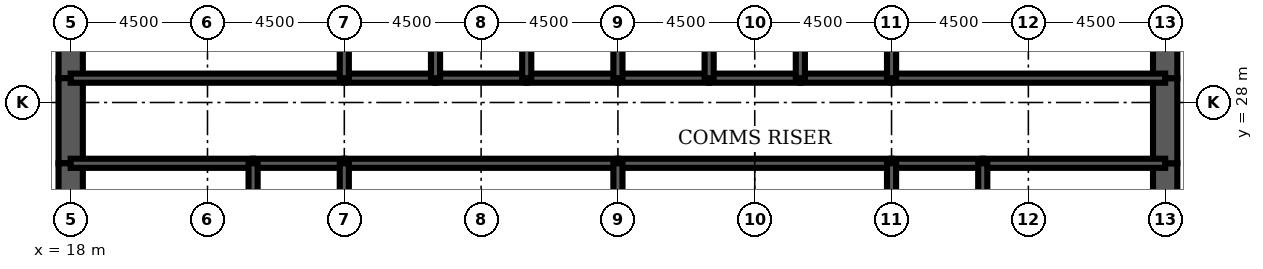
"""IFC4 building model, lengths in metres.
Left out: names, types, materials, properties, quantities, classifications, styles, units other than length and angle.
Written with IfcOpenShell. Run it as: python <this file> out.ifc"""

import sys

from ifc_helpers import new_model, si_unit, direction, frame, frame_2d, origin, place, context, subcontext, project, spatial, rectangle, extrude, element, fill, save


model = new_model("IFC4")
c1 = context("Model", 3, precision=1e-05, world=origin(), true_north=direction((0.0, 1.0)))
c2 = subcontext(c1, "Body", "Model", "MODEL_VIEW")
j1 = project(units=[si_unit("LENGTHUNIT", "METRE"), si_unit("PLANEANGLEUNIT", "RADIAN")], contexts=[c1])
p1 = place(None, origin())
s1 = spatial("IfcSite", under=j1, at=p1, CompositionType="ELEMENT")
p2 = place(p1, origin())
s2 = spatial("IfcBuilding", under=s1, at=p2, CompositionType="ELEMENT")
p3 = place(p2, frame((0.0, 0.0, 232.0)))
s3 = spatial("IfcBuildingStorey", under=s2, at=p3, CompositionType="ELEMENT", Elevation=232.0)
p4 = place(p3, frame((18.0, 32.0, 0.0), z_axis=(0.0, 0.0, 1.0), x_axis=(0.0, -1.0, 0.0)))
e1 = element("IfcWall", 1, at=p4, inside=s3, PredefinedType="SHEAR", context=c2, shape_type="SweptSolid", body=[
    extrude(rectangle(XDim=3.2, YDim=0.8, at=frame_2d((1.6, 0.0))), origin(), (0.0, 0.0, 1.0), 4.2),
])
p5 = place(p3, frame((18.0, 28.8, 0.0), z_axis=(0.0, 0.0, 1.0), x_axis=(0.0, -1.0, 0.0)))
e2 = element("IfcWall", 2, at=p5, inside=s3, PredefinedType="SHEAR", context=c2, shape_type="SweptSolid", body=[
    extrude(rectangle(XDim=2.8, YDim=0.8, at=frame_2d((1.4, 0.0))), origin(), (0.0, 0.0, 1.0), 4.2),
])
p6 = place(p5, frame((0.4, 0.0, 0.0)))
e3 = element("IfcOpeningElement", 3, at=p6, cuts=e2, PredefinedType="OPENING", context=c2, shape_type="SweptSolid", body=[
    extrude(rectangle(XDim=1.8, YDim=2.1, at=frame_2d((0.9, 1.05))), frame((0.0, 0.41, 0.0), z_axis=(0.0, -1.0, 0.0), x_axis=(1.0, 0.0, 0.0)), (0.0, 0.0, 1.0), 0.82),
])
for number, where, z_axis, x_axis in (
    (4, (18.0, 26.0, 0.0), (0.0, 0.0, 1.0), (0.0, -1.0, 0.0)),
    (5, (54.0, 22.0, 0.0), (0.0, 0.0, 1.0), (0.0, 1.0, 0.0)),
):
    element("IfcWall", number, at=place(p3, frame(where, z_axis=z_axis, x_axis=x_axis)), inside=s3, PredefinedType="SHEAR", context=c2, shape_type="SweptSolid", body=[
        extrude(rectangle(XDim=4.0, YDim=0.8, at=frame_2d((2.0, 0.0))), origin(), (0.0, 0.0, 1.0), 4.2),
    ])
p7 = place(p3, frame((54.0, 26.0, 0.0), z_axis=(0.0, 0.0, 1.0), x_axis=(0.0, 1.0, 0.0)))
e6 = element("IfcWall", 6, at=p7, inside=s3, PredefinedType="SHEAR", context=c2, shape_type="SweptSolid", body=[
    extrude(rectangle(XDim=2.8, YDim=0.8, at=frame_2d((1.4, 0.0))), origin(), (0.0, 0.0, 1.0), 4.2),
])
p8 = place(p7, frame((0.6, 0.0, 0.0)))
e7 = element("IfcOpeningElement", 7, at=p8, cuts=e6, PredefinedType="OPENING", context=c2, shape_type="SweptSolid", body=[
    extrude(rectangle(XDim=1.8, YDim=2.1, at=frame_2d((0.9, 1.05))), frame((0.0, 0.41, 0.0), z_axis=(0.0, -1.0, 0.0), x_axis=(1.0, 0.0, 0.0)), (0.0, 0.0, 1.0), 0.82),
])
p9 = place(p3, frame((54.0, 28.8, 0.0), z_axis=(0.0, 0.0, 1.0), x_axis=(0.0, 1.0, 0.0)))
e8 = element("IfcWall", 8, at=p9, inside=s3, PredefinedType="SHEAR", context=c2, shape_type="SweptSolid", body=[
    extrude(rectangle(XDim=3.2, YDim=0.8, at=frame_2d((1.6, 0.0))), origin(), (0.0, 0.0, 1.0), 4.2),
])
p10 = place(p3, frame((18.0, 28.8, 0.0), z_axis=(0.0, 0.0, 1.0), x_axis=(1.0, 0.0, 0.0)))
e9 = element("IfcWall", 9, at=p10, inside=s3, PredefinedType="SOLIDWALL", context=c2, shape_type="SweptSolid", body=[
    extrude(rectangle(XDim=9.0, YDim=0.3, at=frame_2d((4.5, 0.0))), origin(), (0.0, 0.0, 1.0), 4.2),
])
p11 = place(p10, frame((0.65, 0.0, 0.0)))
e10 = element("IfcOpeningElement", 10, at=p11, cuts=e9, PredefinedType="OPENING", context=c2, shape_type="SweptSolid", body=[
    extrude(rectangle(XDim=1.0, YDim=2.1, at=frame_2d((0.5, 1.05))), frame((0.0, 0.16, 0.0), z_axis=(0.0, -1.0, 0.0), x_axis=(1.0, 0.0, 0.0)), (0.0, 0.0, 1.0), 0.32),
])
p12 = place(p3, frame((27.0, 28.8, 0.0), z_axis=(0.0, 0.0, 1.0), x_axis=(1.0, 0.0, 0.0)))
e11 = element("IfcWall", 11, at=p12, inside=s3, PredefinedType="SOLIDWALL", context=c2, shape_type="SweptSolid", body=[
    extrude(rectangle(XDim=3.0, YDim=0.3, at=frame_2d((1.5, 0.0))), origin(), (0.0, 0.0, 1.0), 4.2),
])
p13 = place(p12, frame((0.95, 0.0, 0.0)))
e12 = element("IfcOpeningElement", 12, at=p13, cuts=e11, PredefinedType="OPENING", context=c2, shape_type="SweptSolid", body=[
    extrude(rectangle(XDim=1.1, YDim=2.2, at=frame_2d((0.55, 1.1))), frame((0.0, 0.16, 0.0), z_axis=(0.0, -1.0, 0.0), x_axis=(1.0, 0.0, 0.0)), (0.0, 0.0, 1.0), 0.32),
])
p14 = place(p3, frame((30.0, 28.8, 0.0), z_axis=(0.0, 0.0, 1.0), x_axis=(1.0, 0.0, 0.0)))
e13 = element("IfcWall", 13, at=p14, inside=s3, PredefinedType="SOLIDWALL", context=c2, shape_type="SweptSolid", body=[
    extrude(rectangle(XDim=3.0, YDim=0.3, at=frame_2d((1.5, 0.0))), origin(), (0.0, 0.0, 1.0), 4.2),
])
p15 = place(p14, frame((0.95, 0.0, 0.0)))
e14 = element("IfcOpeningElement", 14, at=p15, cuts=e13, PredefinedType="OPENING", context=c2, shape_type="SweptSolid", body=[
    extrude(rectangle(XDim=1.1, YDim=2.2, at=frame_2d((0.55, 1.1))), frame((0.0, 0.16, 0.0), z_axis=(0.0, -1.0, 0.0), x_axis=(1.0, 0.0, 0.0)), (0.0, 0.0, 1.0), 0.32),
])
p16 = place(p3, frame((33.0, 28.8, 0.0), z_axis=(0.0, 0.0, 1.0), x_axis=(1.0, 0.0, 0.0)))
e15 = element("IfcWall", 15, at=p16, inside=s3, PredefinedType="SOLIDWALL", context=c2, shape_type="SweptSolid", body=[
    extrude(rectangle(XDim=3.0, YDim=0.3, at=frame_2d((1.5, 0.0))), origin(), (0.0, 0.0, 1.0), 4.2),
])
p17 = place(p16, frame((0.95, 0.0, 0.0)))
e16 = element("IfcOpeningElement", 16, at=p17, cuts=e15, PredefinedType="OPENING", context=c2, shape_type="SweptSolid", body=[
    extrude(rectangle(XDim=1.1, YDim=2.2, at=frame_2d((0.55, 1.1))), frame((0.0, 0.16, 0.0), z_axis=(0.0, -1.0, 0.0), x_axis=(1.0, 0.0, 0.0)), (0.0, 0.0, 1.0), 0.32),
])
for number, where, z_axis, x_axis in (
    (17, (36.0, 28.8, 0.0), (0.0, 0.0, 1.0), (1.0, 0.0, 0.0)),
    (18, (39.0, 28.8, 0.0), (0.0, 0.0, 1.0), (1.0, 0.0, 0.0)),
):
    element("IfcWall", number, at=place(p3, frame(where, z_axis=z_axis, x_axis=x_axis)), inside=s3, PredefinedType="SOLIDWALL", context=c2, shape_type="SweptSolid", body=[
        extrude(rectangle(XDim=3.0, YDim=0.3, at=frame_2d((1.5, 0.0))), origin(), (0.0, 0.0, 1.0), 4.2),
    ])
p18 = place(p3, frame((42.0, 28.8, 0.0), z_axis=(0.0, 0.0, 1.0), x_axis=(1.0, 0.0, 0.0)))
e19 = element("IfcWall", 19, at=p18, inside=s3, PredefinedType="SOLIDWALL", context=c2, shape_type="SweptSolid", body=[
    extrude(rectangle(XDim=3.0, YDim=0.3, at=frame_2d((1.5, 0.0))), origin(), (0.0, 0.0, 1.0), 4.2),
])
p19 = place(p18, frame((0.95, 0.0, 0.0)))
e20 = element("IfcOpeningElement", 20, at=p19, cuts=e19, PredefinedType="OPENING", context=c2, shape_type="SweptSolid", body=[
    extrude(rectangle(XDim=1.1, YDim=2.2, at=frame_2d((0.55, 1.1))), frame((0.0, 0.16, 0.0), z_axis=(0.0, -1.0, 0.0), x_axis=(1.0, 0.0, 0.0)), (0.0, 0.0, 1.0), 0.32),
])
p20 = place(p3, frame((45.0, 28.8, 0.0), z_axis=(0.0, 0.0, 1.0), x_axis=(1.0, 0.0, 0.0)))
e21 = element("IfcWall", 21, at=p20, inside=s3, PredefinedType="SOLIDWALL", context=c2, shape_type="SweptSolid", body=[
    extrude(rectangle(XDim=9.0, YDim=0.3, at=frame_2d((4.5, 0.0))), origin(), (0.0, 0.0, 1.0), 4.2),
])
p21 = place(p20, frame((7.35, 0.0, 0.0)))
e22 = element("IfcOpeningElement", 22, at=p21, cuts=e21, PredefinedType="OPENING", context=c2, shape_type="SweptSolid", body=[
    extrude(rectangle(XDim=1.0, YDim=2.1, at=frame_2d((0.5, 1.05))), frame((0.0, 0.16, 0.0), z_axis=(0.0, -1.0, 0.0), x_axis=(1.0, 0.0, 0.0)), (0.0, 0.0, 1.0), 0.32),
])
p22 = place(p3, frame((18.0, 26.0, 0.0), z_axis=(0.0, 0.0, 1.0), x_axis=(1.0, 0.0, 0.0)))
e23 = element("IfcWall", 23, at=p22, inside=s3, PredefinedType="SOLIDWALL", context=c2, shape_type="SweptSolid", body=[
    extrude(rectangle(XDim=6.0, YDim=0.3, at=frame_2d((3.0, 0.0))), origin(), (0.0, 0.0, 1.0), 4.2),
])
p23 = place(p3, frame((24.0, 26.0, 0.0), z_axis=(0.0, 0.0, 1.0), x_axis=(1.0, 0.0, 0.0)))
e24 = element("IfcWall", 24, at=p23, inside=s3, PredefinedType="SOLIDWALL", context=c2, shape_type="SweptSolid", body=[
    extrude(rectangle(XDim=3.0, YDim=0.3, at=frame_2d((1.5, 0.0))), origin(), (0.0, 0.0, 1.0), 4.2),
])
for number, where, z_axis, x_axis in (
    (25, (27.0, 26.0, 0.0), (0.0, 0.0, 1.0), (1.0, 0.0, 0.0)),
    (26, (36.0, 26.0, 0.0), (0.0, 0.0, 1.0), (1.0, 0.0, 0.0)),
):
    element("IfcWall", number, at=place(p3, frame(where, z_axis=z_axis, x_axis=x_axis)), inside=s3, PredefinedType="SOLIDWALL", context=c2, shape_type="SweptSolid", body=[
        extrude(rectangle(XDim=9.0, YDim=0.3, at=frame_2d((4.5, 0.0))), origin(), (0.0, 0.0, 1.0), 4.2),
    ])
p24 = place(p3, frame((45.0, 26.0, 0.0), z_axis=(0.0, 0.0, 1.0), x_axis=(1.0, 0.0, 0.0)))
e27 = element("IfcWall", 27, at=p24, inside=s3, PredefinedType="SOLIDWALL", context=c2, shape_type="SweptSolid", body=[
    extrude(rectangle(XDim=3.0, YDim=0.3, at=frame_2d((1.5, 0.0))), origin(), (0.0, 0.0, 1.0), 4.2),
])
p25 = place(p3, frame((48.0, 26.0, 0.0), z_axis=(0.0, 0.0, 1.0), x_axis=(1.0, 0.0, 0.0)))
e28 = element("IfcWall", 28, at=p25, inside=s3, PredefinedType="SOLIDWALL", context=c2, shape_type="SweptSolid", body=[
    extrude(rectangle(XDim=6.0, YDim=0.3, at=frame_2d((3.0, 0.0))), origin(), (0.0, 0.0, 1.0), 4.2),
])
for number, where, z_axis, x_axis in (
    (29, (27.0, 28.8, 0.0), (0.0, 0.0, 1.0), (0.0, 1.0, 0.0)),
    (30, (30.0, 28.8, 0.0), (0.0, 0.0, 1.0), (0.0, 1.0, 0.0)),
    (31, (33.0, 28.8, 0.0), (0.0, 0.0, 1.0), (0.0, 1.0, 0.0)),
    (32, (36.0, 28.8, 0.0), (0.0, 0.0, 1.0), (0.0, 1.0, 0.0)),
    (33, (39.0, 28.8, 0.0), (0.0, 0.0, 1.0), (0.0, 1.0, 0.0)),
    (34, (42.0, 28.8, 0.0), (0.0, 0.0, 1.0), (0.0, 1.0, 0.0)),
    (35, (45.0, 28.8, 0.0), (0.0, 0.0, 1.0), (0.0, 1.0, 0.0)),
):
    element("IfcWall", number, at=place(p3, frame(where, z_axis=z_axis, x_axis=x_axis)), inside=s3, PredefinedType="SOLIDWALL", context=c2, shape_type="SweptSolid", body=[
        extrude(rectangle(XDim=3.2, YDim=0.3, at=frame_2d((1.6, 0.0))), origin(), (0.0, 0.0, 1.0), 4.2),
    ])
for number, where, z_axis, x_axis in (
    (36, (24.0, 22.0, 0.0), (0.0, 0.0, 1.0), (0.0, 1.0, 0.0)),
    (37, (27.0, 22.0, 0.0), (0.0, 0.0, 1.0), (0.0, 1.0, 0.0)),
    (38, (36.0, 22.0, 0.0), (0.0, 0.0, 1.0), (0.0, 1.0, 0.0)),
    (39, (45.0, 22.0, 0.0), (0.0, 0.0, 1.0), (0.0, 1.0, 0.0)),
    (40, (48.0, 22.0, 0.0), (0.0, 0.0, 1.0), (0.0, 1.0, 0.0)),
):
    element("IfcWall", number, at=place(p3, frame(where, z_axis=z_axis, x_axis=x_axis)), inside=s3, PredefinedType="SOLIDWALL", context=c2, shape_type="SweptSolid", body=[
        extrude(rectangle(XDim=4.0, YDim=0.3, at=frame_2d((2.0, 0.0))), origin(), (0.0, 0.0, 1.0), 4.2),
    ])
p26 = place(p3, frame((38.0, 22.15, 0.0), z_axis=(0.0, 0.0, 1.0), x_axis=(0.0, 1.0, 0.0)))
e41 = element("IfcWall", 41, at=p26, inside=s3, PredefinedType="PARTITIONING", context=c2, shape_type="SweptSolid", body=[
    extrude(rectangle(XDim=3.7, YDim=0.15, at=frame_2d((1.85, 0.0))), origin(), (0.0, 0.0, 1.0), 3.0),
])
p27 = place(p26, frame((2.2, 0.0, 0.0)))
e42 = element("IfcOpeningElement", 42, at=p27, cuts=e41, PredefinedType="OPENING", context=c2, shape_type="SweptSolid", body=[
    extrude(rectangle(XDim=1.0, YDim=2.1, at=frame_2d((0.5, 1.05))), frame((0.0, 0.085, 0.0), z_axis=(0.0, -1.0, 0.0), x_axis=(1.0, 0.0, 0.0)), (0.0, 0.0, 1.0), 0.17),
])
for number, where, z_axis, x_axis in (
    (43, (20.275, 22.15, 0.0), (0.0, 0.0, 1.0), (0.0, 1.0, 0.0)),
    (44, (51.725, 22.15, 0.0), (0.0, 0.0, 1.0), (0.0, 1.0, 0.0)),
):
    element("IfcWall", number, at=place(p3, frame(where, z_axis=z_axis, x_axis=x_axis)), inside=s3, PredefinedType="PARTITIONING", context=c2, shape_type="SweptSolid", body=[
        extrude(rectangle(XDim=3.7, YDim=0.15, at=frame_2d((1.85, 0.0))), origin(), (0.0, 0.0, 1.0), 3.0),
    ])
p28 = place(p27, origin())
e45 = element("IfcDoor", 45, at=p28, inside=s3, OperationType="SINGLE_SWING_RIGHT", PredefinedType="DOOR", context=c2, shape_type="SweptSolid", body=[
    extrude(rectangle(XDim=1.0, YDim=2.1, at=frame_2d((0.5, 1.05))), frame((0.0, 0.025, 0.0), z_axis=(0.0, -1.0, 0.0), x_axis=(1.0, 0.0, 0.0)), (0.0, 0.0, 1.0), 0.05),
])
fill(e42, e45)
p29 = place(p19, origin())
e46 = element("IfcDoor", 46, at=p29, inside=s3, OperationType="DOUBLE_DOOR_SLIDING", PredefinedType="USERDEFINED", context=c2, shape_type="SweptSolid", body=[
    extrude(rectangle(XDim=1.1, YDim=2.2, at=frame_2d((0.55, 1.1))), frame((0.0, 0.025, 0.0), z_axis=(0.0, -1.0, 0.0), x_axis=(1.0, 0.0, 0.0)), (0.0, 0.0, 1.0), 0.05),
])
fill(e20, e46)
p30 = place(p13, origin())
e47 = element("IfcDoor", 47, at=p30, inside=s3, OperationType="DOUBLE_DOOR_SLIDING", PredefinedType="USERDEFINED", context=c2, shape_type="SweptSolid", body=[
    extrude(rectangle(XDim=1.1, YDim=2.2, at=frame_2d((0.55, 1.1))), frame((0.0, 0.025, 0.0), z_axis=(0.0, -1.0, 0.0), x_axis=(1.0, 0.0, 0.0)), (0.0, 0.0, 1.0), 0.05),
])
fill(e12, e47)
p31 = place(p15, origin())
e48 = element("IfcDoor", 48, at=p31, inside=s3, OperationType="DOUBLE_DOOR_SLIDING", PredefinedType="USERDEFINED", context=c2, shape_type="SweptSolid", body=[
    extrude(rectangle(XDim=1.1, YDim=2.2, at=frame_2d((0.55, 1.1))), frame((0.0, 0.025, 0.0), z_axis=(0.0, -1.0, 0.0), x_axis=(1.0, 0.0, 0.0)), (0.0, 0.0, 1.0), 0.05),
])
fill(e14, e48)
p32 = place(p17, origin())
e49 = element("IfcDoor", 49, at=p32, inside=s3, OperationType="DOUBLE_DOOR_SLIDING", PredefinedType="USERDEFINED", context=c2, shape_type="SweptSolid", body=[
    extrude(rectangle(XDim=1.1, YDim=2.2, at=frame_2d((0.55, 1.1))), frame((0.0, 0.025, 0.0), z_axis=(0.0, -1.0, 0.0), x_axis=(1.0, 0.0, 0.0)), (0.0, 0.0, 1.0), 0.05),
])
fill(e16, e49)
p33 = place(p11, origin())
e50 = element("IfcDoor", 50, at=p33, inside=s3, OperationType="SINGLE_SWING_LEFT", PredefinedType="DOOR", context=c2, shape_type="SweptSolid", body=[
    extrude(rectangle(XDim=1.0, YDim=2.1, at=frame_2d((0.5, 1.05))), frame((0.0, 0.025, 0.0), z_axis=(0.0, -1.0, 0.0), x_axis=(1.0, 0.0, 0.0)), (0.0, 0.0, 1.0), 0.05),
])
fill(e10, e50)
p34 = place(p21, origin())
e51 = element("IfcDoor", 51, at=p34, inside=s3, OperationType="SINGLE_SWING_RIGHT", PredefinedType="DOOR", context=c2, shape_type="SweptSolid", body=[
    extrude(rectangle(XDim=1.0, YDim=2.1, at=frame_2d((0.5, 1.05))), frame((0.0, 0.025, 0.0), z_axis=(0.0, -1.0, 0.0), x_axis=(1.0, 0.0, 0.0)), (0.0, 0.0, 1.0), 0.05),
])
fill(e22, e51)
p35 = place(p6, origin())
e52 = element("IfcDoor", 52, at=p35, inside=s3, OperationType="SINGLE_SWING_LEFT", PredefinedType="DOOR", context=c2, shape_type="SweptSolid", body=[
    extrude(rectangle(XDim=1.8, YDim=2.1, at=frame_2d((0.9, 1.05))), frame((0.0, 0.4, 0.0), z_axis=(0.0, -1.0, 0.0), x_axis=(1.0, 0.0, 0.0)), (0.0, 0.0, 1.0), 0.8),
])
fill(e3, e52)
p36 = place(p8, origin())
e53 = element("IfcDoor", 53, at=p36, inside=s3, OperationType="SINGLE_SWING_LEFT", PredefinedType="DOOR", context=c2, shape_type="SweptSolid", body=[
    extrude(rectangle(XDim=1.8, YDim=2.1, at=frame_2d((0.9, 1.05))), frame((0.0, 0.4, 0.0), z_axis=(0.0, -1.0, 0.0), x_axis=(1.0, 0.0, 0.0)), (0.0, 0.0, 1.0), 0.8),
])
fill(e7, e53)
save(model, sys.argv[1])
